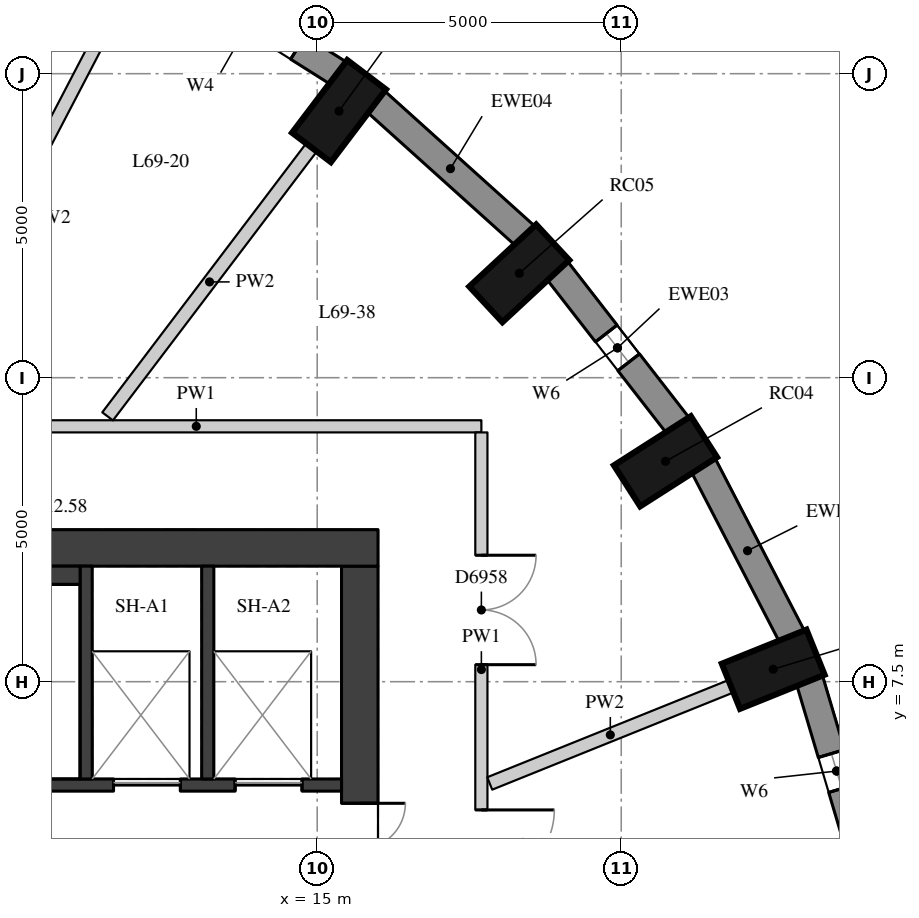
"""IFC4 building model, lengths in metres.
Left out: names, types, materials, properties, quantities, classifications, styles, units other than length and angle.
Written with IfcOpenShell. Run it as: python <this file> out.ifc"""

import sys

from ifc_helpers import new_model, si_unit, direction, frame, frame_2d, origin, origin_2d, place, context, subcontext, project, spatial, rectangle, extrude, element, fill, save


model = new_model("IFC4")
c1 = context("Model", 3, precision=1e-05, world=origin(), true_north=direction((0.0, 1.0)))
c2 = subcontext(c1, "Body", "Model", "MODEL_VIEW")
j1 = project(units=[si_unit("LENGTHUNIT", "METRE"), si_unit("PLANEANGLEUNIT", "RADIAN")], contexts=[c1])
p1 = place(None, origin())
s1 = spatial("IfcSite", under=j1, at=p1, CompositionType="ELEMENT")
p2 = place(p1, origin())
s2 = spatial("IfcBuilding", under=s1, at=p2, CompositionType="ELEMENT")
p3 = place(p2, frame((0.0, 0.0, 243.2)))
s3 = spatial("IfcBuildingStorey", under=s2, at=p3, CompositionType="ELEMENT", Elevation=243.2)
for number, where, z_axis, x_axis in (
    (1, (22.5, 7.705, 0.0), (0.0, 0.0, 1.0), (0.928, 0.374, 0.0)),
    (2, (20.728, 11.125, 0.0), (0.0, 0.0, 1.0), (0.843, 0.539, 0.0)),
    (3, (18.323, 14.216, 0.0), (0.0, 0.0, 1.0), (0.733, 0.681, 0.0)),
    (4, (15.359, 16.885, 0.0), (0.0, 0.0, 1.0), (0.604, 0.797, 0.0)),
):
    element("IfcColumn", number, at=place(p3, frame(where, z_axis=z_axis, x_axis=x_axis)), inside=s3, PredefinedType="COLUMN", context=c2, shape_type="SweptSolid", body=[
        extrude(rectangle(XDim=1.5, YDim=0.8, at=origin_2d()), origin(), (0.0, 0.0, 1.0), 3.3),
    ])
p4 = place(p3, frame((23.99, 4.526, 0.0), z_axis=(0.0, 0.0, 1.0), x_axis=(-0.285263800865, 0.958449040855, 0.0)))
e5 = element("IfcWall", 5, at=p4, inside=s3, PredefinedType="SOLIDWALL", context=c2, shape_type="SweptSolid", body=[
    extrude(rectangle(XDim=3.139, YDim=0.45, at=frame_2d((1.57, 0.0))), origin(), (0.0, 0.0, 1.0), 3.02),
])
p5 = place(p4, frame((1.27, 0.0, 0.4)))
e6 = element("IfcOpeningElement", 6, at=p5, cuts=e5, PredefinedType="OPENING", context=c2, shape_type="SweptSolid", body=[
    extrude(rectangle(XDim=0.6, YDim=1.75, at=frame_2d((0.3, 0.875))), frame((0.0, 0.235, 0.0), z_axis=(0.0, -1.0, 0.0), x_axis=(1.0, 0.0, 0.0)), (0.0, 0.0, 1.0), 0.47),
])
p6 = place(p3, frame((22.81, 8.24, 0.0), z_axis=(0.0, 0.0, 1.0), x_axis=(-0.459889857669, 0.887975967475, 0.0)))
e7 = element("IfcWall", 7, at=p6, inside=s3, PredefinedType="SOLIDWALL", context=c2, shape_type="SweptSolid", body=[
    extrude(rectangle(XDim=3.186, YDim=0.45, at=frame_2d((1.593, 0.0))), origin(), (0.0, 0.0, 1.0), 3.02),
])
p7 = place(p3, frame((20.935, 11.708, 0.0), z_axis=(0.0, 0.0, 1.0), x_axis=(-0.613862536705, 0.789412937587, 0.0)))
e8 = element("IfcWall", 8, at=p7, inside=s3, PredefinedType="SOLIDWALL", context=c2, shape_type="SweptSolid", body=[
    extrude(rectangle(XDim=3.247, YDim=0.45, at=frame_2d((1.624, 0.0))), origin(), (0.0, 0.0, 1.0), 3.02),
])
p8 = place(p7, frame((1.324, 0.0, 0.4)))
e9 = element("IfcOpeningElement", 9, at=p8, cuts=e8, PredefinedType="OPENING", context=c2, shape_type="SweptSolid", body=[
    extrude(rectangle(XDim=0.6, YDim=1.75, at=frame_2d((0.3, 0.875))), frame((0.0, 0.235, 0.0), z_axis=(0.0, -1.0, 0.0), x_axis=(1.0, 0.0, 0.0)), (0.0, 0.0, 1.0), 0.47),
])
p9 = place(p3, frame((18.424, 14.828, 0.0), z_axis=(0.0, 0.0, 1.0), x_axis=(-0.743166014219, 0.669107073128, 0.0)))
e10 = element("IfcWall", 10, at=p9, inside=s3, PredefinedType="SOLIDWALL", context=c2, shape_type="SweptSolid", body=[
    extrude(rectangle(XDim=3.316, YDim=0.45, at=frame_2d((1.658, 0.0))), origin(), (0.0, 0.0, 1.0), 3.02),
])
p10 = place(p3, frame((15.353, 17.506, 0.0), z_axis=(0.0, 0.0, 1.0), x_axis=(-0.845929139811, 0.53329531258, 0.0)))
e11 = element("IfcWall", 11, at=p10, inside=s3, PredefinedType="SOLIDWALL", context=c2, shape_type="SweptSolid", body=[
    extrude(rectangle(XDim=3.385, YDim=0.45, at=frame_2d((1.692, 0.0))), origin(), (0.0, 0.0, 1.0), 3.02),
])
p11 = place(p10, frame((0.792, 0.0, 0.4)))
e12 = element("IfcOpeningElement", 12, at=p11, cuts=e11, PredefinedType="OPENING", context=c2, shape_type="SweptSolid", body=[
    extrude(rectangle(XDim=1.8, YDim=1.75, at=frame_2d((0.9, 0.875))), frame((0.0, 0.235, 0.0), z_axis=(0.0, -1.0, 0.0), x_axis=(1.0, 0.0, 0.0)), (0.0, 0.0, 1.0), 0.47),
])
p12 = place(p3, frame((15.7, -9.4, 0.0), z_axis=(0.0, 0.0, 1.0), x_axis=(0.0, 1.0, 0.0)))
e13 = element("IfcWall", 13, at=p12, inside=s3, PredefinedType="SHEAR", context=c2, shape_type="SweptSolid", body=[
    extrude(rectangle(XDim=18.8, YDim=0.6, at=frame_2d((9.4, 0.0))), origin(), (0.0, 0.0, 1.0), 3.02),
])
p13 = place(p12, frame((13.4, 0.0, 0.0)))
e14 = element("IfcOpeningElement", 14, at=p13, cuts=e13, PredefinedType="OPENING", context=c2, shape_type="SweptSolid", body=[
    extrude(rectangle(XDim=1.5, YDim=2.1, at=frame_2d((0.75, 1.05))), frame((0.0, 0.31, 0.0), z_axis=(0.0, -1.0, 0.0), x_axis=(1.0, 0.0, 0.0)), (0.0, 0.0, 1.0), 0.62),
])
p14 = place(p12, frame((3.9, 0.0, 0.0)))
e15 = element("IfcOpeningElement", 15, at=p14, cuts=e13, PredefinedType="OPENING", context=c2, shape_type="SweptSolid", body=[
    extrude(rectangle(XDim=1.5, YDim=2.1, at=frame_2d((0.75, 1.05))), frame((0.0, 0.31, 0.0), z_axis=(0.0, -1.0, 0.0), x_axis=(1.0, 0.0, 0.0)), (0.0, 0.0, 1.0), 0.62),
])
p15 = place(p3, frame((4.0, 9.7, 0.0), z_axis=(0.0, 0.0, 1.0), x_axis=(1.0, 0.0, 0.0)))
e16 = element("IfcWall", 16, at=p15, inside=s3, PredefinedType="SHEAR", context=c2, shape_type="SweptSolid", body=[
    extrude(rectangle(XDim=12.0, YDim=0.6, at=frame_2d((6.0, 0.0))), origin(), (0.0, 0.0, 1.0), 3.02),
])
p16 = place(p3, frame((4.6, 5.8, 0.0), z_axis=(0.0, 0.0, 1.0), x_axis=(1.0, 0.0, 0.0)))
e17 = element("IfcWall", 17, at=p16, inside=s3, PredefinedType="SHEAR", context=c2, shape_type="SweptSolid", body=[
    extrude(rectangle(XDim=10.8, YDim=0.2, at=frame_2d((5.4, 0.0))), origin(), (0.0, 0.0, 1.0), 3.02),
])
p17 = place(p16, frame((7.05, 0.0, 0.0)))
e18 = element("IfcOpeningElement", 18, at=p17, cuts=e17, PredefinedType="OPENING", context=c2, shape_type="SweptSolid", body=[
    extrude(rectangle(XDim=1.1, YDim=2.1, at=frame_2d((0.55, 1.05))), frame((0.0, 0.11, 0.0), z_axis=(0.0, -1.0, 0.0), x_axis=(1.0, 0.0, 0.0)), (0.0, 0.0, 1.0), 0.22),
])
p18 = place(p16, frame((9.05, 0.0, 0.0)))
e19 = element("IfcOpeningElement", 19, at=p18, cuts=e17, PredefinedType="OPENING", context=c2, shape_type="SweptSolid", body=[
    extrude(rectangle(XDim=1.1, YDim=2.1, at=frame_2d((0.55, 1.05))), frame((0.0, 0.11, 0.0), z_axis=(0.0, -1.0, 0.0), x_axis=(1.0, 0.0, 0.0)), (0.0, 0.0, 1.0), 0.22),
])
for number, where, z_axis, x_axis in (
    (20, (11.2, 5.9, 0.0), (0.0, 0.0, 1.0), (0.0, 1.0, 0.0)),
    (21, (13.2, 5.9, 0.0), (0.0, 0.0, 1.0), (0.0, 1.0, 0.0)),
):
    element("IfcWall", number, at=place(p3, frame(where, z_axis=z_axis, x_axis=x_axis)), inside=s3, PredefinedType="SHEAR", context=c2, shape_type="SweptSolid", body=[
        extrude(rectangle(XDim=3.5, YDim=0.2, at=frame_2d((1.75, 0.0))), origin(), (0.0, 0.0, 1.0), 3.02),
    ])
p19 = place(p3, frame((6.22, 9.25, 0.0), z_axis=(0.0, 0.0, 1.0), x_axis=(1.0, 0.0, 0.0)))
e22 = element("IfcWall", 22, at=p19, inside=s3, PredefinedType="PARTITIONING", context=c2, shape_type="SweptSolid", body=[
    extrude(rectangle(XDim=4.88, YDim=0.3, at=frame_2d((2.44, 0.0))), origin(), (0.0, 0.0, 1.0), 3.02),
])
p20 = place(p3, frame((8.322, 11.7, 0.0), z_axis=(0.0, 0.0, 1.0), x_axis=(1.0, 0.0, 0.0)))
e23 = element("IfcWall", 23, at=p20, inside=s3, PredefinedType="PARTITIONING", context=c2, shape_type="SweptSolid", body=[
    extrude(rectangle(XDim=9.378, YDim=0.2, at=frame_2d((4.689, 0.0))), origin(), (0.0, 0.0, 1.0), 3.02),
])
p21 = place(p20, frame((1.002, 0.0, 0.0)))
e24 = element("IfcOpeningElement", 24, at=p21, cuts=e23, PredefinedType="OPENING", context=c2, shape_type="SweptSolid", body=[
    extrude(rectangle(XDim=0.9, YDim=2.1, at=frame_2d((0.45, 1.05))), frame((0.0, 0.11, 0.0), z_axis=(0.0, -1.0, 0.0), x_axis=(1.0, 0.0, 0.0)), (0.0, 0.0, 1.0), 0.22),
])
p22 = place(p3, frame((17.7, 11.6, 0.0), z_axis=(0.0, 0.0, 1.0), x_axis=(0.0, -1.0, 0.0)))
e25 = element("IfcWall", 25, at=p22, inside=s3, PredefinedType="PARTITIONING", context=c2, shape_type="SweptSolid", body=[
    extrude(rectangle(XDim=7.8, YDim=0.2, at=frame_2d((3.9, 0.0))), origin(), (0.0, 0.0, 1.0), 3.02),
])
p23 = place(p22, frame((6.209, 0.0, 0.0)))
e26 = element("IfcOpeningElement", 26, at=p23, cuts=e25, PredefinedType="OPENING", context=c2, shape_type="SweptSolid", body=[
    extrude(rectangle(XDim=1.2, YDim=2.1, at=frame_2d((0.6, 1.05))), frame((0.0, 0.11, 0.0), z_axis=(0.0, -1.0, 0.0), x_axis=(1.0, 0.0, 0.0)), (0.0, 0.0, 1.0), 0.22),
])
p24 = place(p22, frame((2.02, 0.0, 0.0)))
e27 = element("IfcOpeningElement", 27, at=p24, cuts=e25, PredefinedType="OPENING", context=c2, shape_type="SweptSolid", body=[
    extrude(rectangle(XDim=1.8, YDim=2.1, at=frame_2d((0.9, 1.05))), frame((0.0, 0.11, 0.0), z_axis=(0.0, -1.0, 0.0), x_axis=(1.0, 0.0, 0.0)), (0.0, 0.0, 1.0), 0.22),
])
p25 = place(p3, frame((21.804, 7.424, 0.0), z_axis=(0.0, 0.0, 1.0), x_axis=(-0.927552565226, -0.373692706301, 0.0)))
e28 = element("IfcWall", 28, at=p25, inside=s3, PredefinedType="PARTITIONING", context=c2, shape_type="SweptSolid", body=[
    extrude(rectangle(XDim=4.277, YDim=0.22, at=frame_2d((2.138, 0.0))), origin(), (0.0, 0.0, 1.0), 3.02),
])
p26 = place(p3, frame((14.906, 16.287, 0.0), z_axis=(0.0, 0.0, 1.0), x_axis=(-0.604066831727, -0.796933662739, 0.0)))
e29 = element("IfcWall", 29, at=p26, inside=s3, PredefinedType="PARTITIONING", context=c2, shape_type="SweptSolid", body=[
    extrude(rectangle(XDim=5.551, YDim=0.22, at=frame_2d((2.775, 0.0))), origin(), (0.0, 0.0, 1.0), 3.02),
])
p27 = place(p3, frame((11.578, 18.385, 0.0), z_axis=(0.0, 0.0, 1.0), x_axis=(-0.462372875873, -0.886685583314, 0.0)))
e30 = element("IfcWall", 30, at=p27, inside=s3, PredefinedType="PARTITIONING", context=c2, shape_type="SweptSolid", body=[
    extrude(rectangle(XDim=7.345, YDim=0.22, at=frame_2d((3.672, 0.0))), origin(), (0.0, 0.0, 1.0), 3.02),
])
p28 = place(p5, origin())
e31 = element("IfcWindow", 31, at=p28, inside=s3, PartitioningType="SINGLE_PANEL", PredefinedType="WINDOW", context=c2, shape_type="SweptSolid", body=[
    extrude(rectangle(XDim=0.6, YDim=1.75, at=frame_2d((0.3, 0.875))), frame((0.0, 0.035, 0.0), z_axis=(0.0, -1.0, 0.0), x_axis=(1.0, 0.0, 0.0)), (0.0, 0.0, 1.0), 0.06),
])
fill(e6, e31)
p29 = place(p8, origin())
e32 = element("IfcWindow", 32, at=p29, inside=s3, PartitioningType="SINGLE_PANEL", PredefinedType="WINDOW", context=c2, shape_type="SweptSolid", body=[
    extrude(rectangle(XDim=0.6, YDim=1.75, at=frame_2d((0.3, 0.875))), frame((0.0, 0.035, 0.0), z_axis=(0.0, -1.0, 0.0), x_axis=(1.0, 0.0, 0.0)), (0.0, 0.0, 1.0), 0.06),
])
fill(e9, e32)
p30 = place(p13, origin())
e33 = element("IfcDoor", 33, at=p30, inside=s3, OperationType="DOUBLE_DOOR_SINGLE_SWING", PredefinedType="DOOR", context=c2, shape_type="SweptSolid", body=[
    extrude(rectangle(XDim=1.5, YDim=2.1, at=frame_2d((0.75, 1.05))), frame((0.0, 0.025, 0.0), z_axis=(0.0, -1.0, 0.0), x_axis=(1.0, 0.0, 0.0)), (0.0, 0.0, 1.0), 0.05),
])
fill(e14, e33)
p31 = place(p17, origin())
e34 = element("IfcDoor", 34, at=p31, inside=s3, OperationType="DOUBLE_DOOR_SLIDING", PredefinedType="DOOR", context=c2, shape_type="SweptSolid", body=[
    extrude(rectangle(XDim=1.1, YDim=2.1, at=frame_2d((0.55, 1.05))), frame((0.0, 0.025, 0.0), z_axis=(0.0, -1.0, 0.0), x_axis=(1.0, 0.0, 0.0)), (0.0, 0.0, 1.0), 0.05),
])
fill(e18, e34)
p32 = place(p18, origin())
e35 = element("IfcDoor", 35, at=p32, inside=s3, OperationType="DOUBLE_DOOR_SLIDING", PredefinedType="DOOR", context=c2, shape_type="SweptSolid", body=[
    extrude(rectangle(XDim=1.1, YDim=2.1, at=frame_2d((0.55, 1.05))), frame((0.0, 0.025, 0.0), z_axis=(0.0, -1.0, 0.0), x_axis=(1.0, 0.0, 0.0)), (0.0, 0.0, 1.0), 0.05),
])
fill(e19, e35)
p33 = place(p23, origin())
e36 = element("IfcDoor", 36, at=p33, inside=s3, OperationType="SINGLE_SWING_LEFT", PredefinedType="DOOR", context=c2, shape_type="SweptSolid", body=[
    extrude(rectangle(XDim=1.2, YDim=2.1, at=frame_2d((0.6, 1.05))), frame((0.0, 0.025, 0.0), z_axis=(0.0, -1.0, 0.0), x_axis=(1.0, 0.0, 0.0)), (0.0, 0.0, 1.0), 0.05),
])
fill(e26, e36)
p34 = place(p24, origin())
e37 = element("IfcDoor", 37, at=p34, inside=s3, OperationType="DOUBLE_DOOR_SINGLE_SWING", PredefinedType="DOOR", context=c2, shape_type="SweptSolid", body=[
    extrude(rectangle(XDim=1.8, YDim=2.1, at=frame_2d((0.9, 1.05))), frame((0.0, 0.025, 0.0), z_axis=(0.0, -1.0, 0.0), x_axis=(1.0, 0.0, 0.0)), (0.0, 0.0, 1.0), 0.05),
])
fill(e27, e37)
save(model, sys.argv[1])
